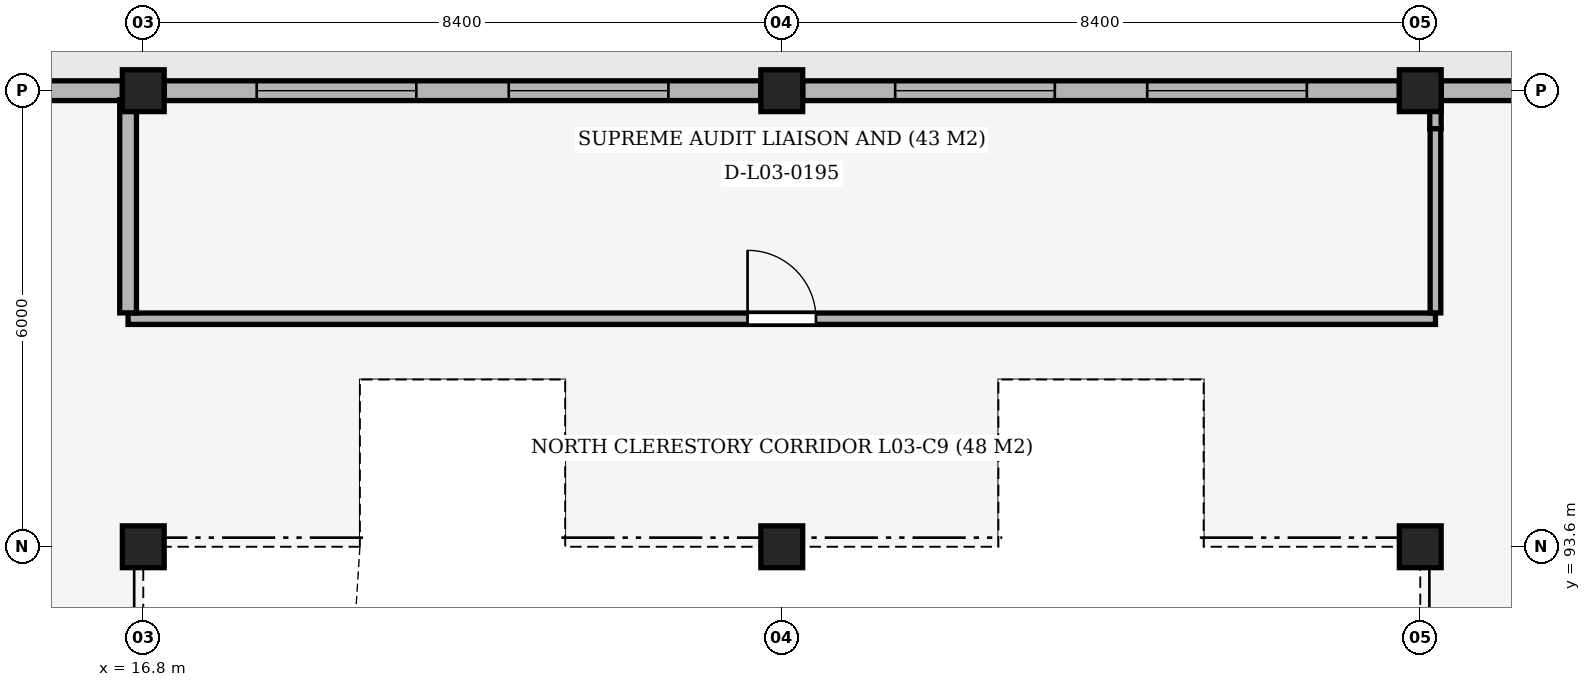
"""IFC4 building model, lengths in metres.
Left out: names, types, materials, properties, quantities, classifications, styles, units other than length and angle.
Written with IfcOpenShell. Run it as: python <this file> out.ifc"""

import sys

from ifc_helpers import new_model, si_unit, direction, frame, frame_2d, origin, origin_2d, place, context, subcontext, project, spatial, rectangle, extrude, element, fill, save


model = new_model("IFC4")
c1 = context("Model", 3, precision=1e-05, world=origin(), true_north=direction((0.0, 1.0)))
c2 = subcontext(c1, "Body", "Model", "MODEL_VIEW")
j1 = project(units=[si_unit("LENGTHUNIT", "METRE"), si_unit("PLANEANGLEUNIT", "RADIAN")], contexts=[c1])
p1 = place(None, origin())
s1 = spatial("IfcSite", under=j1, at=p1, CompositionType="ELEMENT")
p2 = place(p1, origin())
s2 = spatial("IfcBuilding", under=s1, at=p2, CompositionType="ELEMENT")
p3 = place(p2, frame((0.0, 0.0, 15.3)))
s3 = spatial("IfcBuildingStorey", under=s2, at=p3, CompositionType="ELEMENT", Elevation=15.3)
for number, where, z_axis, x_axis in (
    (1, (16.8, 93.6, 0.0), (0.0, 0.0, 1.0), (1.0, 0.0, 0.0)),
    (2, (16.8, 99.6, 0.0), (0.0, 0.0, 1.0), (1.0, 0.0, 0.0)),
    (3, (25.2, 93.6, 0.0), (0.0, 0.0, 1.0), (1.0, 0.0, 0.0)),
    (4, (25.2, 99.6, 0.0), (0.0, 0.0, 1.0), (1.0, 0.0, 0.0)),
    (5, (33.6, 93.6, 0.0), (0.0, 0.0, 1.0), (1.0, 0.0, 0.0)),
    (6, (33.6, 99.6, 0.0), (0.0, 0.0, 1.0), (1.0, 0.0, 0.0)),
):
    element("IfcColumn", number, at=place(p3, frame(where, z_axis=z_axis, x_axis=x_axis)), inside=s3, PredefinedType="COLUMN", context=c2, shape_type="SweptSolid", body=[
        extrude(rectangle(XDim=0.55, YDim=0.55, at=origin_2d()), origin(), (0.0, 0.0, 1.0), 5.1),
    ])
p4 = place(p3, frame((8.7, 99.6, 0.0), z_axis=(0.0, 0.0, 1.0), x_axis=(1.0, 0.0, 0.0)))
e7 = element("IfcWall", 7, at=p4, inside=s3, PredefinedType="SOLIDWALL", context=c2, shape_type="SweptSolid", body=[
    extrude(rectangle(XDim=7.825, YDim=0.26, at=frame_2d((3.913, 0.0))), origin(), (0.0, 0.0, 1.0), 4.45),
])
p5 = place(p4, frame((1.208, 0.0, 0.9)))
e8 = element("IfcOpeningElement", 8, at=p5, cuts=e7, PredefinedType="OPENING", context=c2, shape_type="SweptSolid", body=[
    extrude(rectangle(XDim=2.1, YDim=2.1, at=frame_2d((1.05, 1.05))), frame((0.0, 0.145, 0.0), z_axis=(0.0, -1.0, 0.0), x_axis=(1.0, 0.0, 0.0)), (0.0, 0.0, 1.0), 0.29),
])
p6 = place(p3, frame((17.075, 99.6, 0.0), z_axis=(0.0, 0.0, 1.0), x_axis=(1.0, 0.0, 0.0)))
e9 = element("IfcWall", 9, at=p6, inside=s3, PredefinedType="SOLIDWALL", context=c2, shape_type="SweptSolid", body=[
    extrude(rectangle(XDim=7.85, YDim=0.26, at=frame_2d((3.925, 0.0))), origin(), (0.0, 0.0, 1.0), 4.45),
])
p7 = place(p6, frame((1.217, 0.0, 0.9)))
e10 = element("IfcOpeningElement", 10, at=p7, cuts=e9, PredefinedType="OPENING", context=c2, shape_type="SweptSolid", body=[
    extrude(rectangle(XDim=2.1, YDim=2.1, at=frame_2d((1.05, 1.05))), frame((0.0, 0.145, 0.0), z_axis=(0.0, -1.0, 0.0), x_axis=(1.0, 0.0, 0.0)), (0.0, 0.0, 1.0), 0.29),
])
p8 = place(p6, frame((4.533, 0.0, 0.9)))
e11 = element("IfcOpeningElement", 11, at=p8, cuts=e9, PredefinedType="OPENING", context=c2, shape_type="SweptSolid", body=[
    extrude(rectangle(XDim=2.1, YDim=2.1, at=frame_2d((1.05, 1.05))), frame((0.0, 0.145, 0.0), z_axis=(0.0, -1.0, 0.0), x_axis=(1.0, 0.0, 0.0)), (0.0, 0.0, 1.0), 0.29),
])
p9 = place(p3, frame((25.475, 99.6, 0.0), z_axis=(0.0, 0.0, 1.0), x_axis=(1.0, 0.0, 0.0)))
e12 = element("IfcWall", 12, at=p9, inside=s3, PredefinedType="SOLIDWALL", context=c2, shape_type="SweptSolid", body=[
    extrude(rectangle(XDim=7.85, YDim=0.26, at=frame_2d((3.925, 0.0))), origin(), (0.0, 0.0, 1.0), 4.45),
])
p10 = place(p9, frame((1.217, 0.0, 0.9)))
e13 = element("IfcOpeningElement", 13, at=p10, cuts=e12, PredefinedType="OPENING", context=c2, shape_type="SweptSolid", body=[
    extrude(rectangle(XDim=2.1, YDim=2.1, at=frame_2d((1.05, 1.05))), frame((0.0, 0.145, 0.0), z_axis=(0.0, -1.0, 0.0), x_axis=(1.0, 0.0, 0.0)), (0.0, 0.0, 1.0), 0.29),
])
p11 = place(p9, frame((4.533, 0.0, 0.9)))
e14 = element("IfcOpeningElement", 14, at=p11, cuts=e12, PredefinedType="OPENING", context=c2, shape_type="SweptSolid", body=[
    extrude(rectangle(XDim=2.1, YDim=2.1, at=frame_2d((1.05, 1.05))), frame((0.0, 0.145, 0.0), z_axis=(0.0, -1.0, 0.0), x_axis=(1.0, 0.0, 0.0)), (0.0, 0.0, 1.0), 0.29),
])
p12 = place(p3, frame((33.875, 99.6, 0.0), z_axis=(0.0, 0.0, 1.0), x_axis=(1.0, 0.0, 0.0)))
e15 = element("IfcWall", 15, at=p12, inside=s3, PredefinedType="SOLIDWALL", context=c2, shape_type="SweptSolid", body=[
    extrude(rectangle(XDim=7.85, YDim=0.26, at=frame_2d((3.925, 0.0))), origin(), (0.0, 0.0, 1.0), 4.45),
])
p13 = place(p12, frame((4.533, 0.0, 0.9)))
e16 = element("IfcOpeningElement", 16, at=p13, cuts=e15, PredefinedType="OPENING", context=c2, shape_type="SweptSolid", body=[
    extrude(rectangle(XDim=2.1, YDim=2.1, at=frame_2d((1.05, 1.05))), frame((0.0, 0.145, 0.0), z_axis=(0.0, -1.0, 0.0), x_axis=(1.0, 0.0, 0.0)), (0.0, 0.0, 1.0), 0.29),
])
p14 = place(p3, frame((16.6, 96.6, 0.0), z_axis=(0.0, 0.0, 1.0), x_axis=(1.0, 0.0, 0.0)))
e17 = element("IfcWall", 17, at=p14, inside=s3, PredefinedType="PARTITIONING", context=c2, shape_type="SweptSolid", body=[
    extrude(rectangle(XDim=17.2, YDim=0.15, at=frame_2d((8.6, 0.0))), origin(), (0.0, 0.0, 1.0), 4.29),
])
p15 = place(p14, frame((8.15, 0.0, 0.0)))
e18 = element("IfcOpeningElement", 18, at=p15, cuts=e17, PredefinedType="OPENING", context=c2, shape_type="SweptSolid", body=[
    extrude(rectangle(XDim=0.9, YDim=2.1, at=frame_2d((0.45, 1.05))), frame((0.0, 0.09, 0.0), z_axis=(0.0, -1.0, 0.0), x_axis=(1.0, 0.0, 0.0)), (0.0, 0.0, 1.0), 0.18),
])
p16 = place(p3, frame((16.6, 96.677, 0.0), z_axis=(0.0, 0.0, 1.0), x_axis=(0.0, 1.0, 0.0)))
e19 = element("IfcWall", 19, at=p16, inside=s3, PredefinedType="PARTITIONING", context=c2, shape_type="SweptSolid", body=[
    extrude(rectangle(XDim=2.804, YDim=0.22, at=frame_2d((1.402, 0.0))), origin(), (0.0, 0.0, 1.0), 4.29),
])
p17 = place(p3, frame((33.8, 99.1, 0.0), z_axis=(0.0, 0.0, 1.0), x_axis=(0.0, 1.0, 0.0)))
e20 = element("IfcWall", 20, at=p17, inside=s3, PredefinedType="PARTITIONING", context=c2, shape_type="SweptSolid", body=[
    extrude(rectangle(XDim=0.5, YDim=0.15, at=frame_2d((0.25, 0.0))), origin(), (0.0, 0.0, 1.0), 4.29),
])
p18 = place(p3, frame((33.8, 96.677, 0.0), z_axis=(0.0, 0.0, 1.0), x_axis=(0.0, 1.0, 0.0)))
e21 = element("IfcWall", 21, at=p18, inside=s3, PredefinedType="PARTITIONING", context=c2, shape_type="SweptSolid", body=[
    extrude(rectangle(XDim=2.423, YDim=0.14, at=frame_2d((1.211, 0.0))), origin(), (0.0, 0.0, 1.0), 4.29),
])
p19 = place(p7, origin())
e22 = element("IfcWindow", 22, at=p19, inside=s3, PartitioningType="SINGLE_PANEL", PredefinedType="WINDOW", context=c2, shape_type="SweptSolid", body=[
    extrude(rectangle(XDim=2.1, YDim=2.1, at=frame_2d((1.05, 1.05))), frame((0.0, 0.03, 0.0), z_axis=(0.0, -1.0, 0.0), x_axis=(1.0, 0.0, 0.0)), (0.0, 0.0, 1.0), 0.06),
])
fill(e10, e22)
p20 = place(p8, origin())
e23 = element("IfcWindow", 23, at=p20, inside=s3, PartitioningType="SINGLE_PANEL", PredefinedType="WINDOW", context=c2, shape_type="SweptSolid", body=[
    extrude(rectangle(XDim=2.1, YDim=2.1, at=frame_2d((1.05, 1.05))), frame((0.0, 0.03, 0.0), z_axis=(0.0, -1.0, 0.0), x_axis=(1.0, 0.0, 0.0)), (0.0, 0.0, 1.0), 0.06),
])
fill(e11, e23)
p21 = place(p10, origin())
e24 = element("IfcWindow", 24, at=p21, inside=s3, PartitioningType="SINGLE_PANEL", PredefinedType="WINDOW", context=c2, shape_type="SweptSolid", body=[
    extrude(rectangle(XDim=2.1, YDim=2.1, at=frame_2d((1.05, 1.05))), frame((0.0, 0.03, 0.0), z_axis=(0.0, -1.0, 0.0), x_axis=(1.0, 0.0, 0.0)), (0.0, 0.0, 1.0), 0.06),
])
fill(e13, e24)
p22 = place(p11, origin())
e25 = element("IfcWindow", 25, at=p22, inside=s3, PartitioningType="SINGLE_PANEL", PredefinedType="WINDOW", context=c2, shape_type="SweptSolid", body=[
    extrude(rectangle(XDim=2.1, YDim=2.1, at=frame_2d((1.05, 1.05))), frame((0.0, 0.03, 0.0), z_axis=(0.0, -1.0, 0.0), x_axis=(1.0, 0.0, 0.0)), (0.0, 0.0, 1.0), 0.06),
])
fill(e14, e25)
p23 = place(p15, origin())
e26 = element("IfcDoor", 26, at=p23, inside=s3, OperationType="SINGLE_SWING_LEFT", PredefinedType="DOOR", context=c2, shape_type="SweptSolid", body=[
    extrude(rectangle(XDim=0.9, YDim=2.1, at=frame_2d((0.45, 1.05))), frame((0.0, 0.025, 0.0), z_axis=(0.0, -1.0, 0.0), x_axis=(1.0, 0.0, 0.0)), (0.0, 0.0, 1.0), 0.05),
])
fill(e18, e26)
save(model, sys.argv[1])
